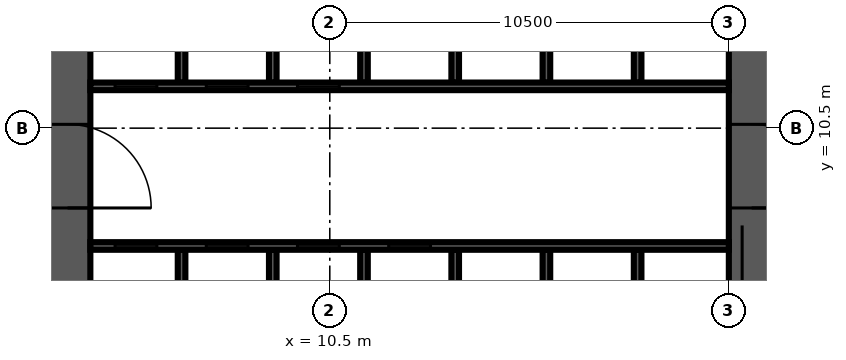
"""IFC4 building model, lengths in metres.
Left out: names, types, materials, properties, quantities, classifications, styles, units other than length and angle.
Written with IfcOpenShell. Run it as: python <this file> out.ifc"""

import sys

from ifc_helpers import new_model, si_unit, direction, frame, frame_2d, origin, place, context, subcontext, project, spatial, rectangle, extrude, source, transform, mapped, element, fill, save


model = new_model("IFC4")
c1 = context("Model", 3, precision=1e-05, world=origin(), true_north=direction((0.0, 1.0)))
c2 = subcontext(c1, "Body", "Model", "MODEL_VIEW")
j1 = project(units=[si_unit("LENGTHUNIT", "METRE"), si_unit("PLANEANGLEUNIT", "RADIAN")], contexts=[c1])
p1 = place(None, origin())
s1 = spatial("IfcSite", under=j1, at=p1, CompositionType="ELEMENT")
p2 = place(p1, origin())
s2 = spatial("IfcBuilding", under=s1, at=p2, CompositionType="ELEMENT")
p3 = place(p2, frame((0.0, 0.0, 48.9)))
s3 = spatial("IfcBuildingStorey", under=s2, at=p3, CompositionType="ELEMENT", Elevation=48.9)
m1 = source(origin(), c2, "Body", "SweptSolid", [
    extrude(rectangle(XDim=18.0, YDim=1.2, at=frame_2d((9.0, 0.0))), origin(), (0.0, 0.0, 1.0), 4.2),
])
p4 = place(p3, frame((3.6, 4.2, 0.0), z_axis=(0.0, 0.0, 1.0), x_axis=(0.0, 1.0, 0.0)))
e1 = element("IfcWall", 1, at=p4, inside=s3, PredefinedType="SHEAR", context=c2, shape_type="MappedRepresentation", body=[
    mapped(m1, transform((0.0, 0.0, 0.0), scale=1.0)),
])
m2 = source(origin(), c2, "Body", "SweptSolid", [
    extrude(rectangle(XDim=2.2, YDim=2.1, at=frame_2d((1.1, 1.05))), frame((0.0, 0.61, 0.0), z_axis=(0.0, -1.0, 0.0), x_axis=(1.0, 0.0, 0.0)), (0.0, 0.0, 1.0), 1.22),
])
p5 = place(p4, frame((4.2, 0.0, 0.0)))
e2 = element("IfcOpeningElement", 2, at=p5, cuts=e1, PredefinedType="OPENING", context=c2, shape_type="MappedRepresentation", body=[
    mapped(m2, transform((0.0, 0.0, 0.0), scale=1.0)),
])
m3 = source(origin(), c2, "Body", "SweptSolid", [
    extrude(rectangle(XDim=16.8, YDim=1.2, at=frame_2d((8.4, 0.0))), origin(), (0.0, 0.0, 1.0), 4.2),
])
p6 = place(p3, frame((21.6, 4.2, 0.0), z_axis=(0.0, 0.0, 1.0), x_axis=(0.0, 1.0, 0.0)))
e3 = element("IfcWall", 3, at=p6, inside=s3, PredefinedType="SHEAR", context=c2, shape_type="MappedRepresentation", body=[
    mapped(m3, transform((0.0, 0.0, 0.0), scale=1.0)),
])
p7 = place(p6, frame((4.2, 0.0, 0.0)))
e4 = element("IfcOpeningElement", 4, at=p7, cuts=e3, PredefinedType="OPENING", context=c2, shape_type="MappedRepresentation", body=[
    mapped(m2, transform((0.0, 0.0, 0.0), scale=1.0)),
])
m4 = source(origin(), c2, "Body", "SweptSolid", [
    extrude(rectangle(XDim=1.2, YDim=2.1, at=frame_2d((0.6, 1.05))), frame((0.0, 0.61, 0.0), z_axis=(0.0, -1.0, 0.0), x_axis=(1.0, 0.0, 0.0)), (0.0, 0.0, 1.0), 1.22),
])
p8 = place(p6, frame((14.7, 0.0, 0.0)))
e5 = element("IfcOpeningElement", 5, at=p8, cuts=e3, PredefinedType="OPENING", context=c2, shape_type="MappedRepresentation", body=[
    mapped(m4, transform((0.0, 0.0, 0.0), scale=1.0)),
])
m5 = source(origin(), c2, "Body", "SweptSolid", [
    extrude(rectangle(XDim=3.1, YDim=0.2, at=frame_2d((1.55, 0.0))), origin(), (0.0, 0.0, 1.0), 4.2),
])
for number, where, z_axis, x_axis in (
    (6, (6.6, 4.2, 0.0), (0.0, 0.0, 1.0), (0.0, 1.0, 0.0)),
    (7, (9.0, 4.2, 0.0), (0.0, 0.0, 1.0), (0.0, 1.0, 0.0)),
    (8, (11.4, 4.2, 0.0), (0.0, 0.0, 1.0), (0.0, 1.0, 0.0)),
    (9, (13.8, 4.2, 0.0), (0.0, 0.0, 1.0), (0.0, 1.0, 0.0)),
    (10, (16.2, 4.2, 0.0), (0.0, 0.0, 1.0), (0.0, 1.0, 0.0)),
    (11, (18.6, 4.2, 0.0), (0.0, 0.0, 1.0), (0.0, 1.0, 0.0)),
):
    element("IfcWall", number, at=place(p3, frame(where, z_axis=z_axis, x_axis=x_axis)), inside=s3, PredefinedType="SOLIDWALL", context=c2, shape_type="MappedRepresentation", body=[
        mapped(m5, transform((0.0, 0.0, 0.0), scale=1.0)),
    ])
m6 = source(origin(), c2, "Body", "SweptSolid", [
    extrude(rectangle(XDim=3.0, YDim=0.2, at=frame_2d((1.5, 0.0))), origin(), (0.0, 0.0, 1.0), 4.2),
])
for number, where, z_axis, x_axis in (
    (12, (6.6, 11.7, 0.0), (0.0, 0.0, 1.0), (0.0, 1.0, 0.0)),
    (13, (9.0, 11.7, 0.0), (0.0, 0.0, 1.0), (0.0, 1.0, 0.0)),
    (14, (11.4, 11.7, 0.0), (0.0, 0.0, 1.0), (0.0, 1.0, 0.0)),
    (15, (13.8, 11.7, 0.0), (0.0, 0.0, 1.0), (0.0, 1.0, 0.0)),
    (16, (16.2, 11.7, 0.0), (0.0, 0.0, 1.0), (0.0, 1.0, 0.0)),
    (17, (18.6, 11.7, 0.0), (0.0, 0.0, 1.0), (0.0, 1.0, 0.0)),
):
    element("IfcWall", number, at=place(p3, frame(where, z_axis=z_axis, x_axis=x_axis)), inside=s3, PredefinedType="SOLIDWALL", context=c2, shape_type="MappedRepresentation", body=[
        mapped(m6, transform((0.0, 0.0, 0.0), scale=1.0)),
    ])
m7 = source(origin(), c2, "Body", "SweptSolid", [
    extrude(rectangle(XDim=16.8, YDim=0.2, at=frame_2d((8.4, 0.0))), origin(), (0.0, 0.0, 1.0), 4.2),
])
p9 = place(p3, frame((4.2, 7.4, 0.0), z_axis=(0.0, 0.0, 1.0), x_axis=(1.0, 0.0, 0.0)))
e18 = element("IfcWall", 18, at=p9, inside=s3, PredefinedType="SOLIDWALL", context=c2, shape_type="MappedRepresentation", body=[
    mapped(m7, transform((0.0, 0.0, 0.0), scale=1.0)),
])
m8 = source(origin(), c2, "Body", "SweptSolid", [
    extrude(rectangle(XDim=1.1, YDim=2.1, at=frame_2d((0.55, 1.05))), frame((0.0, 0.11, 0.0), z_axis=(0.0, -1.0, 0.0), x_axis=(1.0, 0.0, 0.0)), (0.0, 0.0, 1.0), 0.22),
])
p10 = place(p9, frame((0.65, 0.0, 0.0)))
e19 = element("IfcOpeningElement", 19, at=p10, cuts=e18, PredefinedType="OPENING", context=c2, shape_type="MappedRepresentation", body=[
    mapped(m8, transform((0.0, 0.0, 0.0), scale=1.0)),
])
p11 = place(p9, frame((3.05, 0.0, 0.0)))
e20 = element("IfcOpeningElement", 20, at=p11, cuts=e18, PredefinedType="OPENING", context=c2, shape_type="MappedRepresentation", body=[
    mapped(m8, transform((0.0, 0.0, 0.0), scale=1.0)),
])
p12 = place(p9, frame((5.45, 0.0, 0.0)))
e21 = element("IfcOpeningElement", 21, at=p12, cuts=e18, PredefinedType="OPENING", context=c2, shape_type="MappedRepresentation", body=[
    mapped(m8, transform((0.0, 0.0, 0.0), scale=1.0)),
])
p13 = place(p9, frame((7.85, 0.0, 0.0)))
e22 = element("IfcOpeningElement", 22, at=p13, cuts=e18, PredefinedType="OPENING", context=c2, shape_type="MappedRepresentation", body=[
    mapped(m8, transform((0.0, 0.0, 0.0), scale=1.0)),
])
p14 = place(p3, frame((4.2, 11.6, 0.0), z_axis=(0.0, 0.0, 1.0), x_axis=(1.0, 0.0, 0.0)))
e23 = element("IfcWall", 23, at=p14, inside=s3, PredefinedType="SOLIDWALL", context=c2, shape_type="MappedRepresentation", body=[
    mapped(m7, transform((0.0, 0.0, 0.0), scale=1.0)),
])
p15 = place(p14, frame((0.65, 0.0, 0.0)))
e24 = element("IfcOpeningElement", 24, at=p15, cuts=e23, PredefinedType="OPENING", context=c2, shape_type="MappedRepresentation", body=[
    mapped(m8, transform((0.0, 0.0, 0.0), scale=1.0)),
])
p16 = place(p14, frame((3.05, 0.0, 0.0)))
e25 = element("IfcOpeningElement", 25, at=p16, cuts=e23, PredefinedType="OPENING", context=c2, shape_type="MappedRepresentation", body=[
    mapped(m8, transform((0.0, 0.0, 0.0), scale=1.0)),
])
p17 = place(p14, frame((5.45, 0.0, 0.0)))
e26 = element("IfcOpeningElement", 26, at=p17, cuts=e23, PredefinedType="OPENING", context=c2, shape_type="MappedRepresentation", body=[
    mapped(m8, transform((0.0, 0.0, 0.0), scale=1.0)),
])
m9 = source(origin(), c2, "Body", "SweptSolid", [
    extrude(rectangle(XDim=1.1, YDim=2.1, at=frame_2d((0.55, 1.05))), frame((0.0, 0.025, 0.0), z_axis=(0.0, -1.0, 0.0), x_axis=(1.0, 0.0, 0.0)), (0.0, 0.0, 1.0), 0.05),
])
p18 = place(p10, origin())
e27 = element("IfcDoor", 27, at=p18, inside=s3, OperationType="SLIDING_TO_LEFT", PredefinedType="DOOR", context=c2, shape_type="MappedRepresentation", body=[
    mapped(m9, transform((0.0, 0.0, 0.0), scale=1.0)),
])
fill(e19, e27)
p19 = place(p11, origin())
e28 = element("IfcDoor", 28, at=p19, inside=s3, OperationType="SLIDING_TO_LEFT", PredefinedType="DOOR", context=c2, shape_type="MappedRepresentation", body=[
    mapped(m9, transform((0.0, 0.0, 0.0), scale=1.0)),
])
fill(e20, e28)
p20 = place(p12, origin())
e29 = element("IfcDoor", 29, at=p20, inside=s3, OperationType="SLIDING_TO_LEFT", PredefinedType="DOOR", context=c2, shape_type="MappedRepresentation", body=[
    mapped(m9, transform((0.0, 0.0, 0.0), scale=1.0)),
])
fill(e21, e29)
p21 = place(p13, origin())
e30 = element("IfcDoor", 30, at=p21, inside=s3, OperationType="SLIDING_TO_LEFT", PredefinedType="DOOR", context=c2, shape_type="MappedRepresentation", body=[
    mapped(m9, transform((0.0, 0.0, 0.0), scale=1.0)),
])
fill(e22, e30)
p22 = place(p15, origin())
e31 = element("IfcDoor", 31, at=p22, inside=s3, OperationType="SLIDING_TO_LEFT", PredefinedType="DOOR", context=c2, shape_type="MappedRepresentation", body=[
    mapped(m9, transform((0.0, 0.0, 0.0), scale=1.0)),
])
fill(e24, e31)
p23 = place(p16, origin())
e32 = element("IfcDoor", 32, at=p23, inside=s3, OperationType="SLIDING_TO_LEFT", PredefinedType="DOOR", context=c2, shape_type="MappedRepresentation", body=[
    mapped(m9, transform((0.0, 0.0, 0.0), scale=1.0)),
])
fill(e25, e32)
p24 = place(p17, origin())
e33 = element("IfcDoor", 33, at=p24, inside=s3, OperationType="SLIDING_TO_LEFT", PredefinedType="DOOR", context=c2, shape_type="MappedRepresentation", body=[
    mapped(m9, transform((0.0, 0.0, 0.0), scale=1.0)),
])
fill(e26, e33)
m10 = source(origin(), c2, "Body", "SweptSolid", [
    extrude(rectangle(XDim=2.2, YDim=2.1, at=frame_2d((1.1, 1.05))), frame((0.0, 0.025, 0.0), z_axis=(0.0, -1.0, 0.0), x_axis=(1.0, 0.0, 0.0)), (0.0, 0.0, 1.0), 0.05),
])
p25 = place(p7, origin())
e34 = element("IfcDoor", 34, at=p25, inside=s3, OperationType="DOUBLE_DOOR_SINGLE_SWING", PredefinedType="DOOR", context=c2, shape_type="MappedRepresentation", body=[
    mapped(m10, transform((0.0, 0.0, 0.0), scale=1.0)),
])
fill(e4, e34)
p26 = place(p5, origin())
e35 = element("IfcDoor", 35, at=p26, inside=s3, OperationType="DOUBLE_DOOR_SINGLE_SWING", PredefinedType="DOOR", context=c2, shape_type="MappedRepresentation", body=[
    mapped(m10, transform((0.0, 0.0, 0.0), scale=1.0)),
])
fill(e2, e35)
save(model, sys.argv[1])
